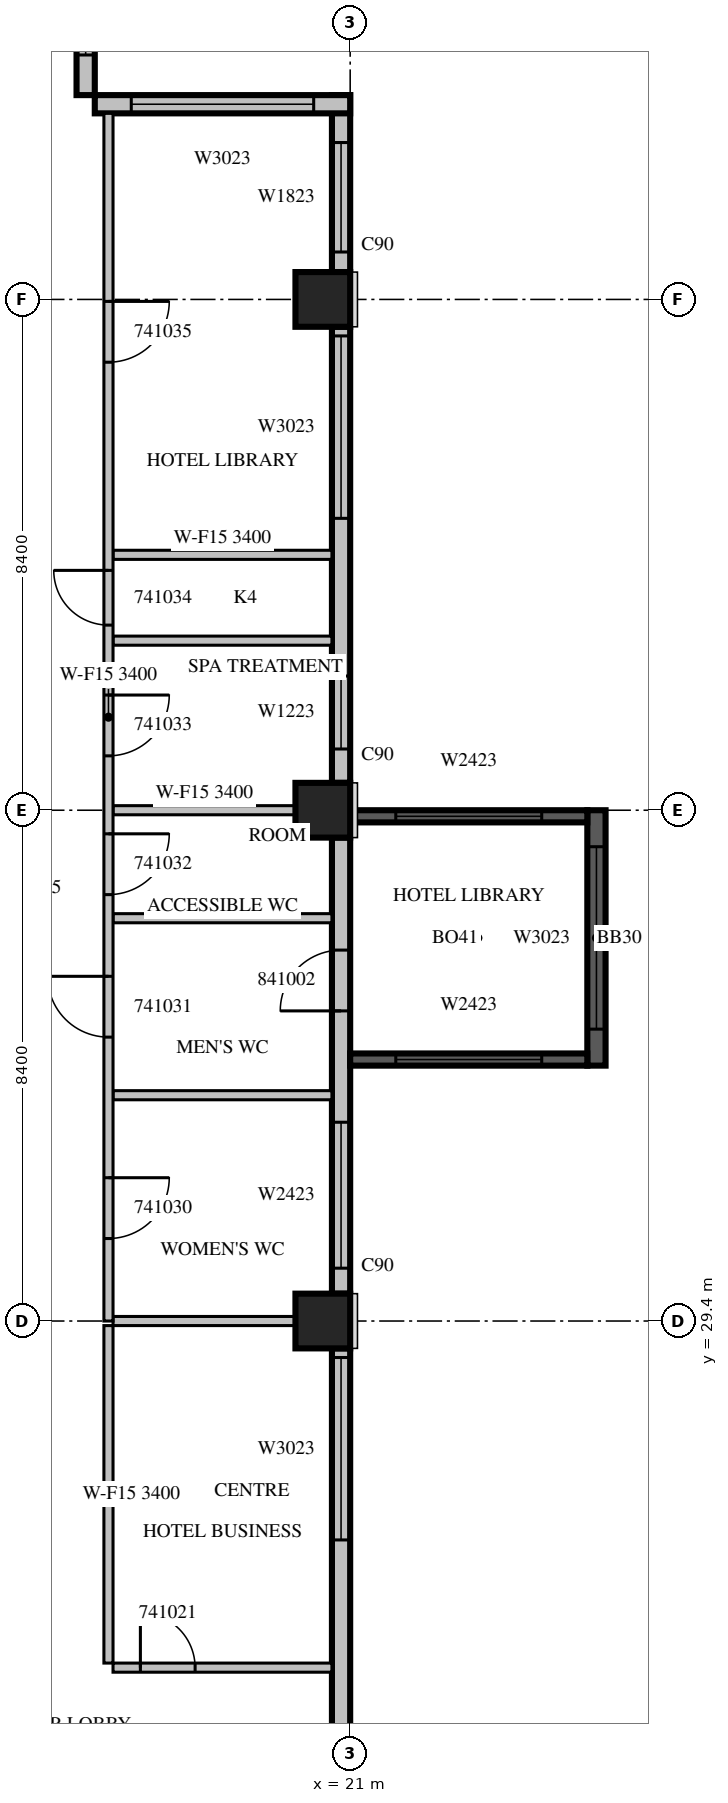
"""IFC4 building model, lengths in metres.
Left out: names, types, materials, properties, quantities, classifications, styles, units other than length and angle.
Written with IfcOpenShell. Run it as: python <this file> out.ifc"""

import sys

from ifc_helpers import new_model, si_unit, direction, frame, frame_2d, origin, origin_2d, place, context, subcontext, project, spatial, rectangle, extrude, source, transform, mapped, element, fill, save


model = new_model("IFC4")
c1 = context("Model", 3, precision=1e-05, world=origin(), true_north=direction((0.0, 1.0)))
c2 = subcontext(c1, "Body", "Model", "MODEL_VIEW")
j1 = project(units=[si_unit("LENGTHUNIT", "METRE"), si_unit("PLANEANGLEUNIT", "RADIAN")], contexts=[c1])
p1 = place(None, origin())
s1 = spatial("IfcSite", under=j1, at=p1, CompositionType="ELEMENT")
p2 = place(p1, origin())
s2 = spatial("IfcBuilding", under=s1, at=p2, CompositionType="ELEMENT")
p3 = place(p2, frame((0.0, 0.0, 189.2)))
s3 = spatial("IfcBuildingStorey", under=s2, at=p3, CompositionType="ELEMENT", Elevation=189.2)
m1 = source(origin(), c2, "Body", "SweptSolid", [
    extrude(rectangle(XDim=0.9, YDim=0.9, at=origin_2d()), origin(), (0.0, 0.0, 1.0), 3.8),
])
for number, where, z_axis, x_axis in (
    (1, (20.55, 29.4, 0.0), (0.0, 0.0, 1.0), (1.0, 0.0, 0.0)),
    (2, (20.55, 37.8, 0.0), (0.0, 0.0, 1.0), (1.0, 0.0, 0.0)),
    (3, (20.55, 46.2, 0.0), (0.0, 0.0, 1.0), (1.0, 0.0, 0.0)),
):
    element("IfcColumn", number, at=place(p3, frame(where, z_axis=z_axis, x_axis=x_axis)), inside=s3, PredefinedType="COLUMN", context=c2, shape_type="MappedRepresentation", body=[
        mapped(m1, transform((0.0, 0.0, 0.0), scale=1.0)),
    ])
m2 = source(origin(), c2, "Body", "SweptSolid", [
    extrude(rectangle(XDim=7.15, YDim=0.3, at=frame_2d((3.575, 0.0))), origin(), (0.0, 0.0, 1.0), 3.4),
])
p4 = place(p3, frame((20.85, 21.8, 0.0), z_axis=(0.0, 0.0, 1.0), x_axis=(0.0, 1.0, 0.0)))
e4 = element("IfcWall", 4, at=p4, inside=s3, PredefinedType="STANDARD", context=c2, shape_type="MappedRepresentation", body=[
    mapped(m2, transform((0.0, 0.0, 0.0), scale=1.0)),
])
m3 = source(origin(), c2, "Body", "SweptSolid", [
    extrude(rectangle(XDim=3.0, YDim=2.3, at=frame_2d((1.5, 1.15))), frame((0.0, 0.16, 0.0), z_axis=(0.0, -1.0, 0.0), x_axis=(1.0, 0.0, 0.0)), (0.0, 0.0, 1.0), 0.32),
])
p5 = place(p4, frame((4.0, 0.0, 0.6)))
e5 = element("IfcOpeningElement", 5, at=p5, cuts=e4, PredefinedType="OPENING", context=c2, shape_type="MappedRepresentation", body=[
    mapped(m3, transform((0.0, 0.0, 0.0), scale=1.0)),
])
m4 = source(origin(), c2, "Body", "SweptSolid", [
    extrude(rectangle(XDim=7.5, YDim=0.3, at=frame_2d((3.75, 0.0))), origin(), (0.0, 0.0, 1.0), 3.4),
])
p6 = place(p3, frame((20.85, 29.85, 0.0), z_axis=(0.0, 0.0, 1.0), x_axis=(0.0, 1.0, 0.0)))
e6 = element("IfcWall", 6, at=p6, inside=s3, PredefinedType="STANDARD", context=c2, shape_type="MappedRepresentation", body=[
    mapped(m4, transform((0.0, 0.0, 0.0), scale=1.0)),
])
m5 = source(origin(), c2, "Body", "SweptSolid", [
    extrude(rectangle(XDim=2.4, YDim=2.3, at=frame_2d((1.2, 1.15))), frame((0.0, 0.16, 0.0), z_axis=(0.0, -1.0, 0.0), x_axis=(1.0, 0.0, 0.0)), (0.0, 0.0, 1.0), 0.32),
])
p7 = place(p6, frame((0.419, 0.0, 0.6)))
e7 = element("IfcOpeningElement", 7, at=p7, cuts=e6, PredefinedType="OPENING", context=c2, shape_type="MappedRepresentation", body=[
    mapped(m5, transform((0.0, 0.0, 0.0), scale=1.0)),
])
m6 = source(origin(), c2, "Body", "SweptSolid", [
    extrude(rectangle(XDim=1.0, YDim=2.1, at=frame_2d((0.5, 1.05))), frame((0.0, 0.16, 0.0), z_axis=(0.0, -1.0, 0.0), x_axis=(1.0, 0.0, 0.0)), (0.0, 0.0, 1.0), 0.32),
])
p8 = place(p6, frame((4.65, 0.0, 0.0)))
e8 = element("IfcOpeningElement", 8, at=p8, cuts=e6, PredefinedType="OPENING", context=c2, shape_type="MappedRepresentation", body=[
    mapped(m6, transform((0.0, 0.0, 0.0), scale=1.0)),
])
p9 = place(p3, frame((20.85, 38.25, 0.0), z_axis=(0.0, 0.0, 1.0), x_axis=(0.0, 1.0, 0.0)))
e9 = element("IfcWall", 9, at=p9, inside=s3, PredefinedType="STANDARD", context=c2, shape_type="MappedRepresentation", body=[
    mapped(m4, transform((0.0, 0.0, 0.0), scale=1.0)),
])
m7 = source(origin(), c2, "Body", "SweptSolid", [
    extrude(rectangle(XDim=1.2, YDim=2.3, at=frame_2d((0.6, 1.15))), frame((0.0, 0.16, 0.0), z_axis=(0.0, -1.0, 0.0), x_axis=(1.0, 0.0, 0.0)), (0.0, 0.0, 1.0), 0.32),
])
p10 = place(p9, frame((0.557, 0.0, 0.6)))
e10 = element("IfcOpeningElement", 10, at=p10, cuts=e9, PredefinedType="OPENING", context=c2, shape_type="MappedRepresentation", body=[
    mapped(m7, transform((0.0, 0.0, 0.0), scale=1.0)),
])
p11 = place(p9, frame((4.35, 0.0, 0.6)))
e11 = element("IfcOpeningElement", 11, at=p11, cuts=e9, PredefinedType="OPENING", context=c2, shape_type="MappedRepresentation", body=[
    mapped(m3, transform((0.0, 0.0, 0.0), scale=1.0)),
])
m8 = source(origin(), c2, "Body", "SweptSolid", [
    extrude(rectangle(XDim=2.91, YDim=0.3, at=frame_2d((1.455, 0.0))), origin(), (0.0, 0.0, 1.0), 3.4),
])
p12 = place(p3, frame((20.85, 46.65, 0.0), z_axis=(0.0, 0.0, 1.0), x_axis=(0.0, 1.0, 0.0)))
e12 = element("IfcWall", 12, at=p12, inside=s3, PredefinedType="STANDARD", context=c2, shape_type="MappedRepresentation", body=[
    mapped(m8, transform((0.0, 0.0, 0.0), scale=1.0)),
])
m9 = source(origin(), c2, "Body", "SweptSolid", [
    extrude(rectangle(XDim=1.8, YDim=2.3, at=frame_2d((0.9, 1.15))), frame((0.0, 0.16, 0.0), z_axis=(0.0, -1.0, 0.0), x_axis=(1.0, 0.0, 0.0)), (0.0, 0.0, 1.0), 0.32),
])
p13 = place(p12, frame((0.33, 0.0, 0.6)))
e13 = element("IfcOpeningElement", 13, at=p13, cuts=e12, PredefinedType="OPENING", context=c2, shape_type="MappedRepresentation", body=[
    mapped(m9, transform((0.0, 0.0, 0.0), scale=1.0)),
])
m10 = source(origin(), c2, "Body", "SweptSolid", [
    extrude(rectangle(XDim=4.2, YDim=0.3, at=frame_2d((2.1, 0.0))), origin(), (0.0, 0.0, 1.0), 3.4),
])
p14 = place(p3, frame((21.0, 49.41, 0.0), z_axis=(0.0, 0.0, 1.0), x_axis=(-1.0, 0.0, 0.0)))
e14 = element("IfcWall", 14, at=p14, inside=s3, PredefinedType="STANDARD", context=c2, shape_type="MappedRepresentation", body=[
    mapped(m10, transform((0.0, 0.0, 0.0), scale=1.0)),
])
p15 = place(p14, frame((0.6, 0.0, 0.6)))
e15 = element("IfcOpeningElement", 15, at=p15, cuts=e14, PredefinedType="OPENING", context=c2, shape_type="MappedRepresentation", body=[
    mapped(m3, transform((0.0, 0.0, 0.0), scale=1.0)),
])
m11 = source(origin(), c2, "Body", "SweptSolid", [
    extrude(rectangle(XDim=2.52, YDim=0.3, at=frame_2d((1.26, 0.0))), origin(), (0.0, 0.0, 1.0), 3.4),
])
p16 = place(p3, frame((16.65, 49.56, 0.0), z_axis=(0.0, 0.0, 1.0), x_axis=(0.0, 1.0, 0.0)))
e16 = element("IfcWall", 16, at=p16, inside=s3, PredefinedType="STANDARD", context=c2, shape_type="MappedRepresentation", body=[
    mapped(m11, transform((0.0, 0.0, 0.0), scale=1.0)),
])
p17 = place(p16, frame((0.66, 0.0, 0.6)))
e17 = element("IfcOpeningElement", 17, at=p17, cuts=e16, PredefinedType="OPENING", context=c2, shape_type="MappedRepresentation", body=[
    mapped(m7, transform((0.0, 0.0, 0.0), scale=1.0)),
])
m12 = source(origin(), c2, "Body", "SweptSolid", [
    extrude(rectangle(XDim=4.2, YDim=0.3, at=frame_2d((2.1, 0.0))), origin(), (0.0, 0.0, 1.0), 3.39),
])
p18 = place(p3, frame((25.05, 33.6, 0.0), z_axis=(0.0, 0.0, 1.0), x_axis=(0.0, 1.0, 0.0)))
e18 = element("IfcWall", 18, at=p18, inside=s3, PredefinedType="SOLIDWALL", context=c2, shape_type="MappedRepresentation", body=[
    mapped(m12, transform((0.0, 0.0, 0.0), scale=1.0)),
])
p19 = place(p18, frame((0.6, 0.0, 0.6)))
e19 = element("IfcOpeningElement", 19, at=p19, cuts=e18, PredefinedType="OPENING", context=c2, shape_type="MappedRepresentation", body=[
    mapped(m3, transform((0.0, 0.0, 0.0), scale=1.0)),
])
m13 = source(origin(), c2, "Body", "SweptSolid", [
    extrude(rectangle(XDim=3.9, YDim=0.2, at=frame_2d((1.95, 0.0))), origin(), (0.0, 0.0, 1.0), 3.39),
])
p20 = place(p3, frame((21.0, 33.7, 0.0), z_axis=(0.0, 0.0, 1.0), x_axis=(1.0, 0.0, 0.0)))
e20 = element("IfcWall", 20, at=p20, inside=s3, PredefinedType="SOLIDWALL", context=c2, shape_type="MappedRepresentation", body=[
    mapped(m13, transform((0.0, 0.0, 0.0), scale=1.0)),
])
m14 = source(origin(), c2, "Body", "SweptSolid", [
    extrude(rectangle(XDim=2.4, YDim=2.3, at=frame_2d((1.2, 1.15))), frame((0.0, 0.11, 0.0), z_axis=(0.0, -1.0, 0.0), x_axis=(1.0, 0.0, 0.0)), (0.0, 0.0, 1.0), 0.22),
])
p21 = place(p20, frame((0.75, 0.0, 0.6)))
e21 = element("IfcOpeningElement", 21, at=p21, cuts=e20, PredefinedType="OPENING", context=c2, shape_type="MappedRepresentation", body=[
    mapped(m14, transform((0.0, 0.0, 0.0), scale=1.0)),
])
p22 = place(p3, frame((21.0, 37.7, 0.0), z_axis=(0.0, 0.0, 1.0), x_axis=(1.0, 0.0, 0.0)))
e22 = element("IfcWall", 22, at=p22, inside=s3, PredefinedType="SOLIDWALL", context=c2, shape_type="MappedRepresentation", body=[
    mapped(m13, transform((0.0, 0.0, 0.0), scale=1.0)),
])
p23 = place(p22, frame((0.75, 0.0, 0.6)))
e23 = element("IfcOpeningElement", 23, at=p23, cuts=e22, PredefinedType="OPENING", context=c2, shape_type="MappedRepresentation", body=[
    mapped(m14, transform((0.0, 0.0, 0.0), scale=1.0)),
])
m15 = source(origin(), c2, "Body", "SweptSolid", [
    extrude(rectangle(XDim=3.6, YDim=0.15, at=frame_2d((1.8, 0.0))), origin(), (0.0, 0.0, 1.0), 3.4),
])
p24 = place(p3, frame((17.1, 23.7, 0.0), z_axis=(0.0, 0.0, 1.0), x_axis=(1.0, 0.0, 0.0)))
e24 = element("IfcWall", 24, at=p24, inside=s3, PredefinedType="PARTITIONING", context=c2, shape_type="MappedRepresentation", body=[
    mapped(m15, transform((0.0, 0.0, 0.0), scale=1.0)),
])
m16 = source(origin(), c2, "Body", "SweptSolid", [
    extrude(rectangle(XDim=0.9, YDim=2.1, at=frame_2d((0.45, 1.05))), frame((0.0, 0.085, 0.0), z_axis=(0.0, -1.0, 0.0), x_axis=(1.0, 0.0, 0.0)), (0.0, 0.0, 1.0), 0.17),
])
p25 = place(p24, frame((0.45, 0.0, 0.0)))
e25 = element("IfcOpeningElement", 25, at=p25, cuts=e24, PredefinedType="OPENING", context=c2, shape_type="MappedRepresentation", body=[
    mapped(m16, transform((0.0, 0.0, 0.0), scale=1.0)),
])
m17 = source(origin(), c2, "Body", "SweptSolid", [
    extrude(rectangle(XDim=5.55, YDim=0.15, at=frame_2d((2.775, 0.0))), origin(), (0.0, 0.0, 1.0), 3.4),
])
p26 = place(p3, frame((17.025, 29.325, 0.0), z_axis=(0.0, 0.0, 1.0), x_axis=(0.0, -1.0, 0.0)))
e26 = element("IfcWall", 26, at=p26, inside=s3, PredefinedType="PARTITIONING", context=c2, shape_type="MappedRepresentation", body=[
    mapped(m17, transform((0.0, 0.0, 0.0), scale=1.0)),
])
m18 = source(origin(), c2, "Body", "SweptSolid", [
    extrude(rectangle(XDim=3.001, YDim=0.15, at=frame_2d((1.5, 0.0))), origin(), (0.0, 0.0, 1.0), 3.4),
])
p27 = place(p3, frame((20.101, 29.4, 0.0), z_axis=(0.0, 0.0, 1.0), x_axis=(-1.0, 0.0, 0.0)))
e27 = element("IfcWall", 27, at=p27, inside=s3, PredefinedType="PARTITIONING", context=c2, shape_type="MappedRepresentation", body=[
    mapped(m18, transform((0.0, 0.0, 0.0), scale=1.0)),
])
for number, where, z_axis, x_axis in (
    (28, (17.1, 33.113, 0.0), (0.0, 0.0, 1.0), (1.0, 0.0, 0.0)),
    (29, (17.1, 36.024, 0.0), (0.0, 0.0, 1.0), (1.0, 0.0, 0.0)),
    (30, (17.1, 40.589, 0.0), (0.0, 0.0, 1.0), (1.0, 0.0, 0.0)),
):
    element("IfcWall", number, at=place(p3, frame(where, z_axis=z_axis, x_axis=x_axis)), inside=s3, PredefinedType="PARTITIONING", context=c2, shape_type="MappedRepresentation", body=[
        mapped(m15, transform((0.0, 0.0, 0.0), scale=1.0)),
    ])
p28 = place(p3, frame((20.101, 37.8, 0.0), z_axis=(0.0, 0.0, 1.0), x_axis=(-1.0, 0.0, 0.0)))
e31 = element("IfcWall", 31, at=p28, inside=s3, PredefinedType="PARTITIONING", context=c2, shape_type="MappedRepresentation", body=[
    mapped(m18, transform((0.0, 0.0, 0.0), scale=1.0)),
])
p29 = place(p3, frame((20.7, 42.0, 0.0), z_axis=(0.0, 0.0, 1.0), x_axis=(-1.0, 0.0, 0.0)))
e32 = element("IfcWall", 32, at=p29, inside=s3, PredefinedType="PARTITIONING", context=c2, shape_type="MappedRepresentation", body=[
    mapped(m15, transform((0.0, 0.0, 0.0), scale=1.0)),
])
m19 = source(origin(), c2, "Body", "SweptSolid", [
    extrude(rectangle(XDim=19.86, YDim=0.15, at=frame_2d((9.93, 0.0))), origin(), (0.0, 0.0, 1.0), 3.4),
])
p30 = place(p3, frame((17.025, 49.26, 0.0), z_axis=(0.0, 0.0, 1.0), x_axis=(0.0, -1.0, 0.0)))
e33 = element("IfcWall", 33, at=p30, inside=s3, PredefinedType="PARTITIONING", context=c2, shape_type="MappedRepresentation", body=[
    mapped(m19, transform((0.0, 0.0, 0.0), scale=1.0)),
])
m20 = source(origin(), c2, "Body", "SweptSolid", [
    extrude(rectangle(XDim=1.0, YDim=2.1, at=frame_2d((0.5, 1.05))), frame((0.0, 0.085, 0.0), z_axis=(0.0, -1.0, 0.0), x_axis=(1.0, 0.0, 0.0)), (0.0, 0.0, 1.0), 0.17),
])
p31 = place(p30, frame((17.503, 0.0, 0.0)))
e34 = element("IfcOpeningElement", 34, at=p31, cuts=e33, PredefinedType="OPENING", context=c2, shape_type="MappedRepresentation", body=[
    mapped(m20, transform((0.0, 0.0, 0.0), scale=1.0)),
])
p32 = place(p30, frame((14.191, 0.0, 0.0)))
e35 = element("IfcOpeningElement", 35, at=p32, cuts=e33, PredefinedType="OPENING", context=c2, shape_type="MappedRepresentation", body=[
    mapped(m20, transform((0.0, 0.0, 0.0), scale=1.0)),
])
p33 = place(p30, frame((11.848, 0.0, 0.0)))
e36 = element("IfcOpeningElement", 36, at=p33, cuts=e33, PredefinedType="OPENING", context=c2, shape_type="MappedRepresentation", body=[
    mapped(m20, transform((0.0, 0.0, 0.0), scale=1.0)),
])
p34 = place(p30, frame((9.566, 0.0, 0.0)))
e37 = element("IfcOpeningElement", 37, at=p34, cuts=e33, PredefinedType="OPENING", context=c2, shape_type="MappedRepresentation", body=[
    mapped(m20, transform((0.0, 0.0, 0.0), scale=1.0)),
])
p35 = place(p30, frame((7.516, 0.0, 0.0)))
e38 = element("IfcOpeningElement", 38, at=p35, cuts=e33, PredefinedType="OPENING", context=c2, shape_type="MappedRepresentation", body=[
    mapped(m16, transform((0.0, 0.0, 0.0), scale=1.0)),
])
p36 = place(p30, frame((3.092, 0.0, 0.0)))
e39 = element("IfcOpeningElement", 39, at=p36, cuts=e33, PredefinedType="OPENING", context=c2, shape_type="MappedRepresentation", body=[
    mapped(m20, transform((0.0, 0.0, 0.0), scale=1.0)),
])
m21 = source(origin(), c2, "Body", "SweptSolid", [
    extrude(rectangle(XDim=3.0, YDim=2.3, at=frame_2d((1.5, 1.15))), frame((0.0, 0.03, 0.0), z_axis=(0.0, -1.0, 0.0), x_axis=(1.0, 0.0, 0.0)), (0.0, 0.0, 1.0), 0.06),
])
p37 = place(p5, origin())
e40 = element("IfcWindow", 40, at=p37, inside=s3, PartitioningType="SINGLE_PANEL", PredefinedType="WINDOW", context=c2, shape_type="MappedRepresentation", body=[
    mapped(m21, transform((0.0, 0.0, 0.0), scale=1.0)),
])
fill(e5, e40)
m22 = source(origin(), c2, "Body", "SweptSolid", [
    extrude(rectangle(XDim=2.4, YDim=2.3, at=frame_2d((1.2, 1.15))), frame((0.0, 0.03, 0.0), z_axis=(0.0, -1.0, 0.0), x_axis=(1.0, 0.0, 0.0)), (0.0, 0.0, 1.0), 0.06),
])
p38 = place(p7, origin())
e41 = element("IfcWindow", 41, at=p38, inside=s3, PartitioningType="SINGLE_PANEL", PredefinedType="WINDOW", context=c2, shape_type="MappedRepresentation", body=[
    mapped(m22, transform((0.0, 0.0, 0.0), scale=1.0)),
])
fill(e7, e41)
m23 = source(origin(), c2, "Body", "SweptSolid", [
    extrude(rectangle(XDim=1.2, YDim=2.3, at=frame_2d((0.6, 1.15))), frame((0.0, 0.03, 0.0), z_axis=(0.0, -1.0, 0.0), x_axis=(1.0, 0.0, 0.0)), (0.0, 0.0, 1.0), 0.06),
])
p39 = place(p10, origin())
e42 = element("IfcWindow", 42, at=p39, inside=s3, PartitioningType="SINGLE_PANEL", PredefinedType="WINDOW", context=c2, shape_type="MappedRepresentation", body=[
    mapped(m23, transform((0.0, 0.0, 0.0), scale=1.0)),
])
fill(e10, e42)
p40 = place(p11, origin())
e43 = element("IfcWindow", 43, at=p40, inside=s3, PartitioningType="SINGLE_PANEL", PredefinedType="WINDOW", context=c2, shape_type="MappedRepresentation", body=[
    mapped(m21, transform((0.0, 0.0, 0.0), scale=1.0)),
])
fill(e11, e43)
m24 = source(origin(), c2, "Body", "SweptSolid", [
    extrude(rectangle(XDim=1.8, YDim=2.3, at=frame_2d((0.9, 1.15))), frame((0.0, 0.03, 0.0), z_axis=(0.0, -1.0, 0.0), x_axis=(1.0, 0.0, 0.0)), (0.0, 0.0, 1.0), 0.06),
])
p41 = place(p13, origin())
e44 = element("IfcWindow", 44, at=p41, inside=s3, PartitioningType="SINGLE_PANEL", PredefinedType="WINDOW", context=c2, shape_type="MappedRepresentation", body=[
    mapped(m24, transform((0.0, 0.0, 0.0), scale=1.0)),
])
fill(e13, e44)
p42 = place(p15, origin())
e45 = element("IfcWindow", 45, at=p42, inside=s3, PartitioningType="SINGLE_PANEL", PredefinedType="WINDOW", context=c2, shape_type="MappedRepresentation", body=[
    mapped(m21, transform((0.0, 0.0, 0.0), scale=1.0)),
])
fill(e15, e45)
p43 = place(p17, origin())
e46 = element("IfcWindow", 46, at=p43, inside=s3, PartitioningType="SINGLE_PANEL", PredefinedType="WINDOW", context=c2, shape_type="MappedRepresentation", body=[
    mapped(m23, transform((0.0, 0.0, 0.0), scale=1.0)),
])
fill(e17, e46)
p44 = place(p19, origin())
e47 = element("IfcWindow", 47, at=p44, inside=s3, PartitioningType="SINGLE_PANEL", PredefinedType="WINDOW", context=c2, shape_type="MappedRepresentation", body=[
    mapped(m21, transform((0.0, 0.0, 0.0), scale=1.0)),
])
fill(e19, e47)
p45 = place(p21, origin())
e48 = element("IfcWindow", 48, at=p45, inside=s3, PartitioningType="SINGLE_PANEL", PredefinedType="WINDOW", context=c2, shape_type="MappedRepresentation", body=[
    mapped(m22, transform((0.0, 0.0, 0.0), scale=1.0)),
])
fill(e21, e48)
p46 = place(p23, origin())
e49 = element("IfcWindow", 49, at=p46, inside=s3, PartitioningType="SINGLE_PANEL", PredefinedType="WINDOW", context=c2, shape_type="MappedRepresentation", body=[
    mapped(m22, transform((0.0, 0.0, 0.0), scale=1.0)),
])
fill(e23, e49)
m25 = source(origin(), c2, "Body", "SweptSolid", [
    extrude(rectangle(XDim=0.9, YDim=2.1, at=frame_2d((0.45, 1.05))), frame((0.0, 0.025, 0.0), z_axis=(0.0, -1.0, 0.0), x_axis=(1.0, 0.0, 0.0)), (0.0, 0.0, 1.0), 0.05),
])
p47 = place(p25, origin())
e50 = element("IfcDoor", 50, at=p47, inside=s3, OperationType="SINGLE_SWING_LEFT", PredefinedType="DOOR", context=c2, shape_type="MappedRepresentation", body=[
    mapped(m25, transform((0.0, 0.0, 0.0), scale=1.0)),
])
fill(e25, e50)
m26 = source(origin(), c2, "Body", "SweptSolid", [
    extrude(rectangle(XDim=1.0, YDim=2.1, at=frame_2d((0.5, 1.05))), frame((0.0, 0.025, 0.0), z_axis=(0.0, -1.0, 0.0), x_axis=(1.0, 0.0, 0.0)), (0.0, 0.0, 1.0), 0.05),
])
p48 = place(p31, origin())
e51 = element("IfcDoor", 51, at=p48, inside=s3, OperationType="SINGLE_SWING_LEFT", PredefinedType="DOOR", context=c2, shape_type="MappedRepresentation", body=[
    mapped(m26, transform((0.0, 0.0, 0.0), scale=1.0)),
])
fill(e34, e51)
p49 = place(p32, origin())
e52 = element("IfcDoor", 52, at=p49, inside=s3, OperationType="SINGLE_SWING_RIGHT", PredefinedType="DOOR", context=c2, shape_type="MappedRepresentation", body=[
    mapped(m26, transform((0.0, 0.0, 0.0), scale=1.0)),
])
fill(e35, e52)
p50 = place(p33, origin())
e53 = element("IfcDoor", 53, at=p50, inside=s3, OperationType="SINGLE_SWING_LEFT", PredefinedType="DOOR", context=c2, shape_type="MappedRepresentation", body=[
    mapped(m26, transform((0.0, 0.0, 0.0), scale=1.0)),
])
fill(e36, e53)
p51 = place(p34, origin())
e54 = element("IfcDoor", 54, at=p51, inside=s3, OperationType="SINGLE_SWING_LEFT", PredefinedType="DOOR", context=c2, shape_type="MappedRepresentation", body=[
    mapped(m26, transform((0.0, 0.0, 0.0), scale=1.0)),
])
fill(e37, e54)
p52 = place(p35, origin())
e55 = element("IfcDoor", 55, at=p52, inside=s3, OperationType="SINGLE_SWING_RIGHT", PredefinedType="DOOR", context=c2, shape_type="MappedRepresentation", body=[
    mapped(m25, transform((0.0, 0.0, 0.0), scale=1.0)),
])
fill(e38, e55)
p53 = place(p36, origin())
e56 = element("IfcDoor", 56, at=p53, inside=s3, OperationType="SINGLE_SWING_LEFT", PredefinedType="DOOR", context=c2, shape_type="MappedRepresentation", body=[
    mapped(m26, transform((0.0, 0.0, 0.0), scale=1.0)),
])
fill(e39, e56)
p54 = place(p8, origin())
e57 = element("IfcDoor", 57, at=p54, inside=s3, OperationType="SINGLE_SWING_LEFT", PredefinedType="DOOR", context=c2, shape_type="MappedRepresentation", body=[
    mapped(m26, transform((0.0, 0.0, 0.0), scale=1.0)),
])
fill(e8, e57)
save(model, sys.argv[1])
